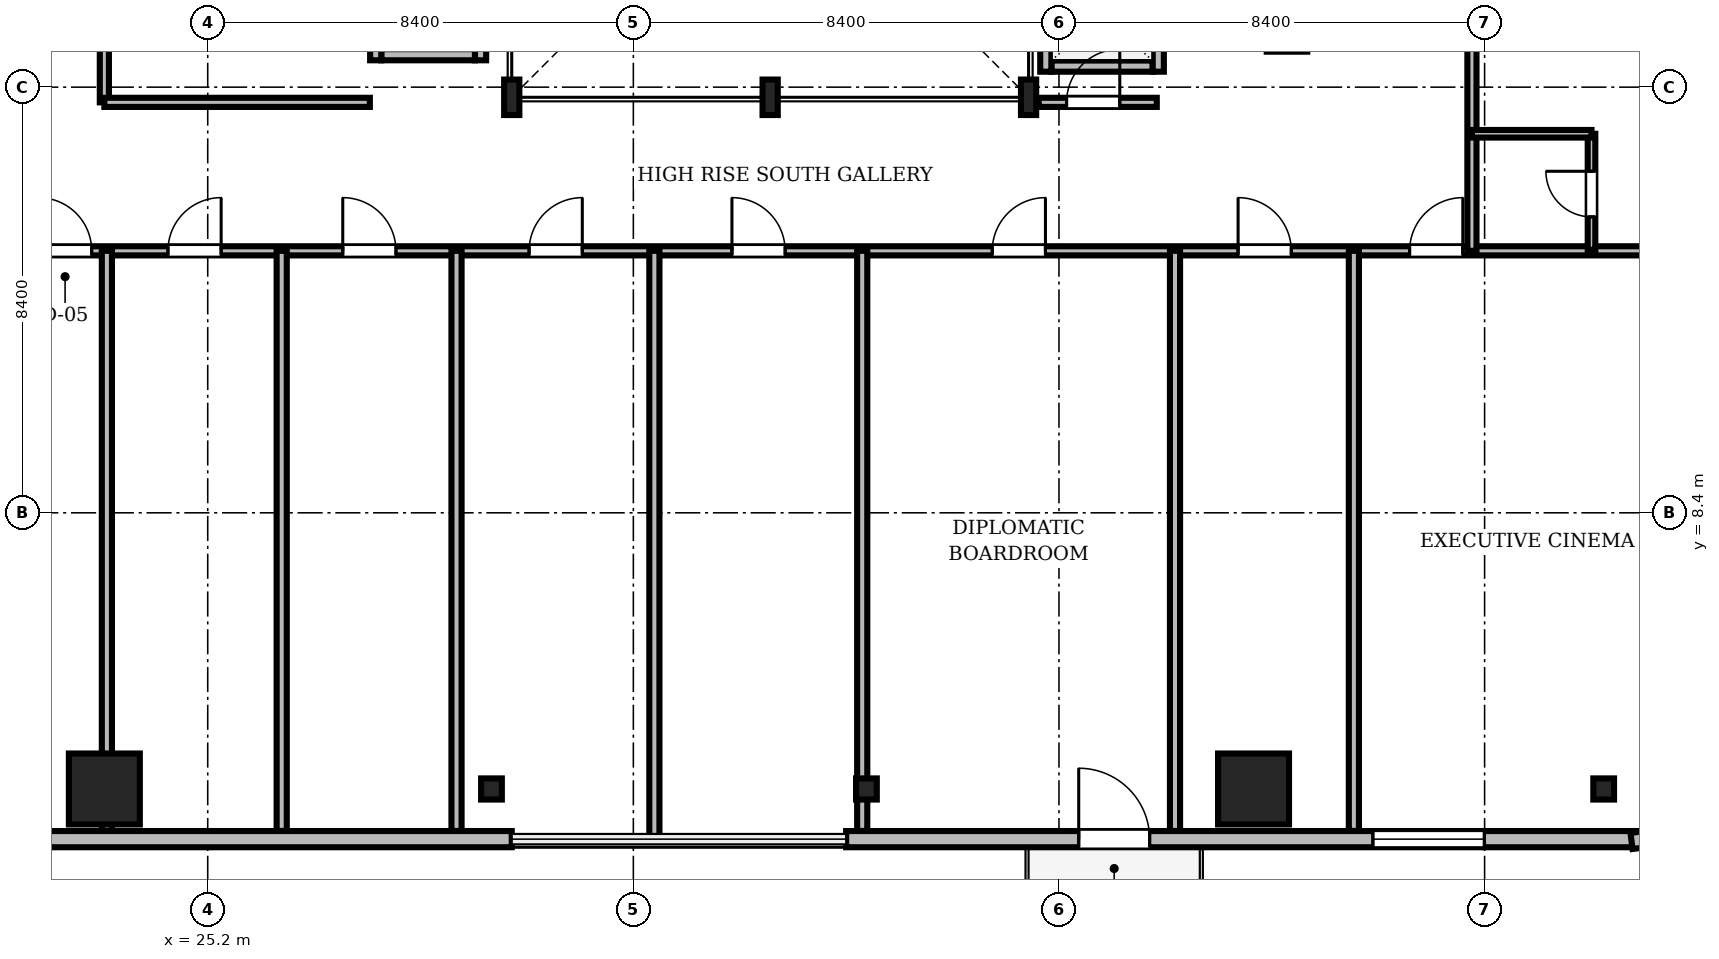
"""IFC4 building model, lengths in metres.
Left out: names, types, materials, properties, quantities, classifications, styles, units other than length and angle.
Written with IfcOpenShell. Run it as: python <this file> out.ifc"""

import sys

from ifc_helpers import new_model, si_unit, direction, frame, frame_2d, origin, origin_2d, place, context, subcontext, project, spatial, rectangle, i_section, extrude, source, transform, mapped, element, fill, save


model = new_model("IFC4")
c1 = context("Model", 3, precision=1e-05, world=origin(), true_north=direction((0.0, 1.0)))
c2 = subcontext(c1, "Body", "Model", "MODEL_VIEW")
j1 = project(units=[si_unit("LENGTHUNIT", "METRE"), si_unit("PLANEANGLEUNIT", "RADIAN")], contexts=[c1])
p1 = place(None, origin())
s1 = spatial("IfcSite", under=j1, at=p1, CompositionType="ELEMENT")
p2 = place(p1, origin())
s2 = spatial("IfcBuilding", under=s1, at=p2, CompositionType="ELEMENT")
p3 = place(p2, frame((0.0, 0.0, 222.3)))
s3 = spatial("IfcBuildingStorey", under=s2, at=p3, CompositionType="ELEMENT", Elevation=222.3)
m1 = source(origin(), c2, "Body", "SweptSolid", [
    extrude(i_section(OverallWidth=0.3, OverallDepth=0.7, WebThickness=0.017, FlangeThickness=0.032, FilletRadius=0.027, at=origin_2d()), origin(), (0.0, 0.0, 1.0), 3.53),
])
for number, where, z_axis, x_axis in (
    (1, (31.2, 16.6, 0.0), (0.0, 0.0, 1.0), (1.0, 0.0, 0.0)),
    (2, (36.3, 16.6, 0.0), (0.0, 0.0, 1.0), (1.0, 0.0, 0.0)),
    (3, (41.4, 16.6, 0.0), (0.0, 0.0, 1.0), (1.0, 0.0, 0.0)),
):
    element("IfcColumn", number, at=place(p3, frame(where, z_axis=z_axis, x_axis=x_axis)), inside=s3, PredefinedType="COLUMN", context=c2, shape_type="MappedRepresentation", body=[
        mapped(m1, transform((0.0, 0.0, 0.0), scale=1.0)),
    ])
m2 = source(origin(), c2, "Body", "SweptSolid", [
    extrude(rectangle(XDim=1.4, YDim=1.4, at=origin_2d()), origin(), (0.0, 0.0, 1.0), 3.53),
])
for number, where, z_axis, x_axis in (
    (4, (23.16, 2.95, 0.0), (0.0, 0.0, 1.0), (1.0, 0.0, 0.0)),
    (5, (45.84, 2.95, 0.0), (0.0, 0.0, 1.0), (1.0, 0.0, 0.0)),
):
    element("IfcColumn", number, at=place(p3, frame(where, z_axis=z_axis, x_axis=x_axis)), inside=s3, PredefinedType="COLUMN", context=c2, shape_type="MappedRepresentation", body=[
        mapped(m2, transform((0.0, 0.0, 0.0), scale=1.0)),
    ])
m3 = source(origin(), c2, "Body", "SweptSolid", [
    extrude(i_section(OverallWidth=0.409, OverallDepth=0.417, WebThickness=0.021, FlangeThickness=0.033, FilletRadius=0.015, at=origin_2d()), origin(), (0.0, 0.0, 1.0), 3.53),
])
for number, where, z_axis, x_axis in (
    (6, (30.8, 2.95, 0.0), (0.0, 0.0, 1.0), (1.0, 0.0, 0.0)),
    (7, (38.2, 2.95, 0.0), (0.0, 0.0, 1.0), (1.0, 0.0, 0.0)),
    (8, (52.75, 2.95, 0.0), (0.0, 0.0, 1.0), (1.0, 0.0, 0.0)),
):
    element("IfcColumn", number, at=place(p3, frame(where, z_axis=z_axis, x_axis=x_axis)), inside=s3, PredefinedType="COLUMN", context=c2, shape_type="MappedRepresentation", body=[
        mapped(m3, transform((0.0, 0.0, 0.0), scale=1.0)),
    ])
m4 = source(origin(), c2, "Body", "SweptSolid", [
    extrude(rectangle(XDim=15.6, YDim=0.32, at=frame_2d((7.8, 0.0))), origin(), (0.0, 0.0, 1.0), 3.53),
])
p4 = place(p3, frame((15.6, 1.96, 0.0), z_axis=(0.0, 0.0, 1.0), x_axis=(1.0, 0.0, 0.0)))
e9 = element("IfcWall", 9, at=p4, inside=s3, PredefinedType="SOLIDWALL", context=c2, shape_type="MappedRepresentation", body=[
    mapped(m4, transform((0.0, 0.0, 0.0), scale=1.0)),
])
m5 = source(origin(), c2, "Body", "SweptSolid", [
    extrude(rectangle(XDim=2.2, YDim=2.4, at=frame_2d((1.1, 1.2))), frame((0.0, 0.17, 0.0), z_axis=(0.0, -1.0, 0.0), x_axis=(1.0, 0.0, 0.0)), (0.0, 0.0, 1.0), 0.34),
])
p5 = place(p4, frame((3.005, 0.0, 0.72)))
e10 = element("IfcOpeningElement", 10, at=p5, cuts=e9, PredefinedType="OPENING", context=c2, shape_type="MappedRepresentation", body=[
    mapped(m5, transform((0.0, 0.0, 0.0), scale=1.0)),
])
p6 = place(p3, frame((37.8, 1.96, 0.0), z_axis=(0.0, 0.0, 1.0), x_axis=(1.0, 0.0, 0.0)))
e11 = element("IfcWall", 11, at=p6, inside=s3, PredefinedType="SOLIDWALL", context=c2, shape_type="MappedRepresentation", body=[
    mapped(m4, transform((0.0, 0.0, 0.0), scale=1.0)),
])
m6 = source(origin(), c2, "Body", "SweptSolid", [
    extrude(rectangle(XDim=1.4, YDim=2.3, at=frame_2d((0.7, 1.15))), frame((0.0, 0.17, 0.0), z_axis=(0.0, -1.0, 0.0), x_axis=(1.0, 0.0, 0.0)), (0.0, 0.0, 1.0), 0.34),
])
p7 = place(p6, frame((4.59, 0.0, 0.0)))
e12 = element("IfcOpeningElement", 12, at=p7, cuts=e11, PredefinedType="OPENING", context=c2, shape_type="MappedRepresentation", body=[
    mapped(m6, transform((0.0, 0.0, 0.0), scale=1.0)),
])
p8 = place(p6, frame((10.395, 0.0, 0.72)))
e13 = element("IfcOpeningElement", 13, at=p8, cuts=e11, PredefinedType="OPENING", context=c2, shape_type="MappedRepresentation", body=[
    mapped(m5, transform((0.0, 0.0, 0.0), scale=1.0)),
])
m7 = source(origin(), c2, "Body", "SweptSolid", [
    extrude(rectangle(XDim=1.17, YDim=0.32, at=frame_2d((0.585, 0.0))), origin(), (0.0, 0.0, 1.0), 3.53),
])
p9 = place(p3, frame((53.3, 1.925, 0.0), z_axis=(0.0, 0.0, 1.0), x_axis=(0.991762485493, 0.128090485085, 0.0)))
e14 = element("IfcWall", 14, at=p9, inside=s3, PredefinedType="SOLIDWALL", context=c2, shape_type="MappedRepresentation", body=[
    mapped(m7, transform((0.0, 0.0, 0.0), scale=1.0)),
])
m8 = source(origin(), c2, "Body", "SweptSolid", [
    extrude(rectangle(XDim=2.0, YDim=0.22, at=frame_2d((1.0, 0.0))), origin(), (0.0, 0.0, 1.0), 3.53),
])
p10 = place(p3, frame((41.85, 17.215, 0.0), z_axis=(0.0, 0.0, 1.0), x_axis=(1.0, 0.0, 0.0)))
e15 = element("IfcWall", 15, at=p10, inside=s3, PredefinedType="SOLIDWALL", context=c2, shape_type="MappedRepresentation", body=[
    mapped(m8, transform((0.0, 0.0, 0.0), scale=1.0)),
])
m9 = source(origin(), c2, "Body", "SweptSolid", [
    extrude(rectangle(XDim=2.19, YDim=0.22, at=frame_2d((1.095, 0.0))), origin(), (0.0, 0.0, 1.0), 3.53),
])
p11 = place(p3, frame((41.74, 17.105, 0.0), z_axis=(0.0, 0.0, 1.0), x_axis=(0.0, 1.0, 0.0)))
e16 = element("IfcWall", 16, at=p11, inside=s3, PredefinedType="SOLIDWALL", context=c2, shape_type="MappedRepresentation", body=[
    mapped(m9, transform((0.0, 0.0, 0.0), scale=1.0)),
])
p12 = place(p3, frame((43.96, 17.105, 0.0), z_axis=(0.0, 0.0, 1.0), x_axis=(0.0, 1.0, 0.0)))
e17 = element("IfcWall", 17, at=p12, inside=s3, PredefinedType="SOLIDWALL", context=c2, shape_type="MappedRepresentation", body=[
    mapped(m9, transform((0.0, 0.0, 0.0), scale=1.0)),
])
m10 = source(origin(), c2, "Body", "SweptSolid", [
    extrude(rectangle(XDim=1.1, YDim=2.2, at=frame_2d((0.55, 1.1))), frame((0.0, 0.12, 0.0), z_axis=(0.0, -1.0, 0.0), x_axis=(1.0, 0.0, 0.0)), (0.0, 0.0, 1.0), 0.24),
])
p13 = place(p12, frame((0.545, 0.0, 0.0)))
e18 = element("IfcOpeningElement", 18, at=p13, cuts=e17, PredefinedType="OPENING", context=c2, shape_type="MappedRepresentation", body=[
    mapped(m10, transform((0.0, 0.0, 0.0), scale=1.0)),
])
m11 = source(origin(), c2, "Body", "SweptSolid", [
    extrude(rectangle(XDim=1.85, YDim=0.22, at=frame_2d((0.925, 0.0))), origin(), (0.0, 0.0, 1.0), 2.972),
])
p14 = place(p3, frame((28.625, 17.44, 0.0), z_axis=(0.0, 0.0, 1.0), x_axis=(1.0, 0.0, 0.0)))
e19 = element("IfcWall", 19, at=p14, inside=s3, PredefinedType="SOLIDWALL", context=c2, shape_type="MappedRepresentation", body=[
    mapped(m11, transform((0.0, 0.0, 0.0), scale=1.0)),
])
m12 = source(origin(), c2, "Body", "SweptSolid", [
    extrude(rectangle(XDim=2.54, YDim=0.22, at=frame_2d((1.27, 0.0))), origin(), (0.0, 0.0, 1.0), 2.972),
])
p15 = place(p3, frame((28.515, 17.33, 0.0), z_axis=(0.0, 0.0, 1.0), x_axis=(0.0, 1.0, 0.0)))
e20 = element("IfcWall", 20, at=p15, inside=s3, PredefinedType="SOLIDWALL", context=c2, shape_type="MappedRepresentation", body=[
    mapped(m12, transform((0.0, 0.0, 0.0), scale=1.0)),
])
m13 = source(origin(), c2, "Body", "SweptSolid", [
    extrude(rectangle(XDim=2.54, YDim=0.22, at=frame_2d((1.27, 0.0))), origin(), (0.0, 0.0, 1.0), 3.53),
])
p16 = place(p3, frame((30.585, 17.33, 0.0), z_axis=(0.0, 0.0, 1.0), x_axis=(0.0, 1.0, 0.0)))
e21 = element("IfcWall", 21, at=p16, inside=s3, PredefinedType="SOLIDWALL", context=c2, shape_type="MappedRepresentation", body=[
    mapped(m13, transform((0.0, 0.0, 0.0), scale=1.0)),
])
m14 = source(origin(), c2, "Body", "SweptSolid", [
    extrude(rectangle(XDim=46.156, YDim=0.18, at=frame_2d((23.078, 0.0))), origin(), (0.0, 0.0, 1.0), 2.772),
])
p17 = place(p3, frame((11.422, 13.57, 0.0), z_axis=(0.0, 0.0, 1.0), x_axis=(1.0, 0.0, 0.0)))
e22 = element("IfcWall", 22, at=p17, inside=s3, PredefinedType="PARTITIONING", context=c2, shape_type="MappedRepresentation", body=[
    mapped(m14, transform((0.0, 0.0, 0.0), scale=1.0)),
])
m15 = source(origin(), c2, "Body", "SweptSolid", [
    extrude(rectangle(XDim=1.05, YDim=2.2, at=frame_2d((0.525, 1.1))), frame((0.0, 0.1, 0.0), z_axis=(0.0, -1.0, 0.0), x_axis=(1.0, 0.0, 0.0)), (0.0, 0.0, 1.0), 0.2),
])
p18 = place(p17, frame((10.438, 0.0, 0.0)))
e23 = element("IfcOpeningElement", 23, at=p18, cuts=e22, PredefinedType="OPENING", context=c2, shape_type="MappedRepresentation", body=[
    mapped(m15, transform((0.0, 0.0, 0.0), scale=1.0)),
])
p19 = place(p17, frame((12.993, 0.0, 0.0)))
e24 = element("IfcOpeningElement", 24, at=p19, cuts=e22, PredefinedType="OPENING", context=c2, shape_type="MappedRepresentation", body=[
    mapped(m15, transform((0.0, 0.0, 0.0), scale=1.0)),
])
p20 = place(p17, frame((16.443, 0.0, 0.0)))
e25 = element("IfcOpeningElement", 25, at=p20, cuts=e22, PredefinedType="OPENING", context=c2, shape_type="MappedRepresentation", body=[
    mapped(m15, transform((0.0, 0.0, 0.0), scale=1.0)),
])
p21 = place(p17, frame((20.121, 0.0, 0.0)))
e26 = element("IfcOpeningElement", 26, at=p21, cuts=e22, PredefinedType="OPENING", context=c2, shape_type="MappedRepresentation", body=[
    mapped(m15, transform((0.0, 0.0, 0.0), scale=1.0)),
])
p22 = place(p17, frame((24.124, 0.0, 0.0)))
e27 = element("IfcOpeningElement", 27, at=p22, cuts=e22, PredefinedType="OPENING", context=c2, shape_type="MappedRepresentation", body=[
    mapped(m15, transform((0.0, 0.0, 0.0), scale=1.0)),
])
p23 = place(p17, frame((29.261, 0.0, 0.0)))
e28 = element("IfcOpeningElement", 28, at=p23, cuts=e22, PredefinedType="OPENING", context=c2, shape_type="MappedRepresentation", body=[
    mapped(m15, transform((0.0, 0.0, 0.0), scale=1.0)),
])
p24 = place(p17, frame((34.113, 0.0, 0.0)))
e29 = element("IfcOpeningElement", 29, at=p24, cuts=e22, PredefinedType="OPENING", context=c2, shape_type="MappedRepresentation", body=[
    mapped(m15, transform((0.0, 0.0, 0.0), scale=1.0)),
])
p25 = place(p17, frame((37.498, 0.0, 0.0)))
e30 = element("IfcOpeningElement", 30, at=p25, cuts=e22, PredefinedType="OPENING", context=c2, shape_type="MappedRepresentation", body=[
    mapped(m15, transform((0.0, 0.0, 0.0), scale=1.0)),
])
m16 = source(origin(), c2, "Body", "SweptSolid", [
    extrude(rectangle(XDim=27.53, YDim=0.18, at=frame_2d((13.765, 0.0))), origin(), (0.0, 0.0, 1.0), 2.972),
])
p26 = place(p3, frame((50.15, 13.57, 0.0), z_axis=(0.0, 0.0, 1.0), x_axis=(0.0, 1.0, 0.0)))
e31 = element("IfcWall", 31, at=p26, inside=s3, PredefinedType="PARTITIONING", context=c2, shape_type="MappedRepresentation", body=[
    mapped(m16, transform((0.0, 0.0, 0.0), scale=1.0)),
])
p27 = place(p26, frame((5.217, 0.0, 0.0)))
e32 = element("IfcOpeningElement", 32, at=p27, cuts=e31, PredefinedType="OPENING", context=c2, shape_type="MappedRepresentation", body=[
    mapped(m15, transform((0.0, 0.0, 0.0), scale=1.0)),
])
p28 = place(p26, frame((14.32, 0.0, 0.0)))
e33 = element("IfcOpeningElement", 33, at=p28, cuts=e31, PredefinedType="OPENING", context=c2, shape_type="MappedRepresentation", body=[
    mapped(m15, transform((0.0, 0.0, 0.0), scale=1.0)),
])
p29 = place(p26, frame((23.423, 0.0, 0.0)))
e34 = element("IfcOpeningElement", 34, at=p29, cuts=e31, PredefinedType="OPENING", context=c2, shape_type="MappedRepresentation", body=[
    mapped(m15, transform((0.0, 0.0, 0.0), scale=1.0)),
])
m17 = source(origin(), c2, "Body", "SweptSolid", [
    extrude(rectangle(XDim=11.94, YDim=0.18, at=frame_2d((5.97, 0.0))), origin(), (0.0, 0.0, 1.0), 2.972),
])
p30 = place(p3, frame((23.16, 16.5, 0.0), z_axis=(0.0, 0.0, 1.0), x_axis=(0.0, 1.0, 0.0)))
e35 = element("IfcWall", 35, at=p30, inside=s3, PredefinedType="PARTITIONING", context=c2, shape_type="MappedRepresentation", body=[
    mapped(m17, transform((0.0, 0.0, 0.0), scale=1.0)),
])
p31 = place(p30, frame((4.5, 0.0, 0.0)))
e36 = element("IfcOpeningElement", 36, at=p31, cuts=e35, PredefinedType="OPENING", context=c2, shape_type="MappedRepresentation", body=[
    mapped(m15, transform((0.0, 0.0, 0.0), scale=1.0)),
])
m18 = source(origin(), c2, "Body", "SweptSolid", [
    extrude(rectangle(XDim=2.33, YDim=0.18, at=frame_2d((1.165, 0.0))), origin(), (0.0, 0.0, 1.0), 2.972),
])
p32 = place(p3, frame((41.6, 16.5, 0.0), z_axis=(0.0, 0.0, 1.0), x_axis=(1.0, 0.0, 0.0)))
e37 = element("IfcWall", 37, at=p32, inside=s3, PredefinedType="PARTITIONING", context=c2, shape_type="MappedRepresentation", body=[
    mapped(m18, transform((0.0, 0.0, 0.0), scale=1.0)),
])
p33 = place(p32, frame((0.55, 0.0, 0.0)))
e38 = element("IfcOpeningElement", 38, at=p33, cuts=e37, PredefinedType="OPENING", context=c2, shape_type="MappedRepresentation", body=[
    mapped(m15, transform((0.0, 0.0, 0.0), scale=1.0)),
])
m19 = source(origin(), c2, "Body", "SweptSolid", [
    extrude(rectangle(XDim=2.29, YDim=0.15, at=frame_2d((1.145, 0.0))), origin(), (0.0, 0.0, 1.0), 2.972),
])
p34 = place(p3, frame((52.51, 13.59, 0.0), z_axis=(0.0, 0.0, 1.0), x_axis=(0.0, 1.0, 0.0)))
e39 = element("IfcWall", 39, at=p34, inside=s3, PredefinedType="PARTITIONING", context=c2, shape_type="MappedRepresentation", body=[
    mapped(m19, transform((0.0, 0.0, 0.0), scale=1.0)),
])
m20 = source(origin(), c2, "Body", "SweptSolid", [
    extrude(rectangle(XDim=0.9, YDim=2.1, at=frame_2d((0.45, 1.05))), frame((0.0, 0.085, 0.0), z_axis=(0.0, -1.0, 0.0), x_axis=(1.0, 0.0, 0.0)), (0.0, 0.0, 1.0), 0.17),
])
p35 = place(p34, frame((0.65, 0.0, 0.0)))
e40 = element("IfcOpeningElement", 40, at=p35, cuts=e39, PredefinedType="OPENING", context=c2, shape_type="MappedRepresentation", body=[
    mapped(m20, transform((0.0, 0.0, 0.0), scale=1.0)),
])
m21 = source(origin(), c2, "Body", "SweptSolid", [
    extrude(rectangle(XDim=11.448, YDim=0.2, at=frame_2d((5.724, 0.0))), origin(), (0.0, 0.0, 1.0), 2.772),
])
for number, where, z_axis, x_axis in (
    (41, (23.21, 2.122, 0.0), (0.0, 0.0, 1.0), (0.0, 1.0, 0.0)),
    (42, (26.66, 2.122, 0.0), (0.0, 0.0, 1.0), (0.0, 1.0, 0.0)),
    (43, (30.11, 2.122, 0.0), (0.0, 0.0, 1.0), (0.0, 1.0, 0.0)),
):
    element("IfcWall", number, at=place(p3, frame(where, z_axis=z_axis, x_axis=x_axis)), inside=s3, PredefinedType="PARTITIONING", context=c2, shape_type="MappedRepresentation", body=[
        mapped(m21, transform((0.0, 0.0, 0.0), scale=1.0)),
    ])
m22 = source(origin(), c2, "Body", "SweptSolid", [
    extrude(rectangle(XDim=11.64, YDim=0.2, at=frame_2d((5.82, 0.0))), origin(), (0.0, 0.0, 1.0), 2.772),
])
p36 = place(p3, frame((34.015, 1.93, 0.0), z_axis=(0.0, 0.0, 1.0), x_axis=(0.0, 1.0, 0.0)))
e44 = element("IfcWall", 44, at=p36, inside=s3, PredefinedType="PARTITIONING", context=c2, shape_type="MappedRepresentation", body=[
    mapped(m22, transform((0.0, 0.0, 0.0), scale=1.0)),
])
for number, where, z_axis, x_axis in (
    (45, (38.117, 2.122, 0.0), (0.0, 0.0, 1.0), (0.0, 1.0, 0.0)),
    (46, (44.29, 2.122, 0.0), (0.0, 0.0, 1.0), (0.0, 1.0, 0.0)),
    (47, (47.82, 2.122, 0.0), (0.0, 0.0, 1.0), (0.0, 1.0, 0.0)),
):
    element("IfcWall", number, at=place(p3, frame(where, z_axis=z_axis, x_axis=x_axis)), inside=s3, PredefinedType="PARTITIONING", context=c2, shape_type="MappedRepresentation", body=[
        mapped(m21, transform((0.0, 0.0, 0.0), scale=1.0)),
    ])
m23 = source(origin(), c2, "Body", "SweptSolid", [
    extrude(rectangle(XDim=5.24, YDim=0.18, at=frame_2d((2.62, 0.0))), origin(), (0.0, 0.0, 1.0), 3.53),
])
p37 = place(p3, frame((23.16, 16.5, 0.0), z_axis=(0.0, 0.0, 1.0), x_axis=(1.0, 0.0, 0.0)))
e48 = element("IfcWall", 48, at=p37, inside=s3, PredefinedType="PARTITIONING", context=c2, shape_type="MappedRepresentation", body=[
    mapped(m23, transform((0.0, 0.0, 0.0), scale=1.0)),
])
m24 = source(origin(), c2, "Body", "SweptSolid", [
    extrude(rectangle(XDim=2.36, YDim=0.15, at=frame_2d((1.18, 0.0))), origin(), (0.0, 0.0, 1.0), 3.53),
])
p38 = place(p3, frame((50.15, 15.88, 0.0), z_axis=(0.0, 0.0, 1.0), x_axis=(1.0, 0.0, 0.0)))
e49 = element("IfcWall", 49, at=p38, inside=s3, PredefinedType="PARTITIONING", context=c2, shape_type="MappedRepresentation", body=[
    mapped(m24, transform((0.0, 0.0, 0.0), scale=1.0)),
])
m25 = source(origin(), c2, "Body", "SweptSolid", [
    extrude(rectangle(XDim=1.4, YDim=2.3, at=frame_2d((0.7, 1.15))), frame((0.0, 0.025, 0.0), z_axis=(0.0, -1.0, 0.0), x_axis=(1.0, 0.0, 0.0)), (0.0, 0.0, 1.0), 0.05),
])
p39 = place(p7, frame((1.4, 0.0, 0.0), z_axis=(0.0, 0.0, 1.0), x_axis=(-1.0, 0.0, 0.0)))
e50 = element("IfcDoor", 50, at=p39, inside=s3, OperationType="DOUBLE_DOOR_SLIDING", PredefinedType="DOOR", context=c2, shape_type="MappedRepresentation", body=[
    mapped(m25, transform((0.0, 0.0, 0.0), scale=1.0)),
])
fill(e12, e50)
m26 = source(origin(), c2, "Body", "SweptSolid", [
    extrude(rectangle(XDim=2.2, YDim=2.4, at=frame_2d((1.1, 1.2))), frame((0.0, 0.03, 0.0), z_axis=(0.0, -1.0, 0.0), x_axis=(1.0, 0.0, 0.0)), (0.0, 0.0, 1.0), 0.06),
])
p40 = place(p8, origin())
e51 = element("IfcWindow", 51, at=p40, inside=s3, PartitioningType="SINGLE_PANEL", PredefinedType="WINDOW", context=c2, shape_type="MappedRepresentation", body=[
    mapped(m26, transform((0.0, 0.0, 0.0), scale=1.0)),
])
fill(e13, e51)
m27 = source(origin(), c2, "Body", "SweptSolid", [
    extrude(rectangle(XDim=1.05, YDim=2.2, at=frame_2d((0.525, 1.1))), frame((0.0, 0.025, 0.0), z_axis=(0.0, -1.0, 0.0), x_axis=(1.0, 0.0, 0.0)), (0.0, 0.0, 1.0), 0.05),
])
p41 = place(p18, origin())
e52 = element("IfcDoor", 52, at=p41, inside=s3, OperationType="SINGLE_SWING_LEFT", PredefinedType="DOOR", context=c2, shape_type="MappedRepresentation", body=[
    mapped(m27, transform((0.0, 0.0, 0.0), scale=1.0)),
])
fill(e23, e52)
p42 = place(p19, origin())
e53 = element("IfcDoor", 53, at=p42, inside=s3, OperationType="SINGLE_SWING_RIGHT", PredefinedType="DOOR", context=c2, shape_type="MappedRepresentation", body=[
    mapped(m27, transform((0.0, 0.0, 0.0), scale=1.0)),
])
fill(e24, e53)
p43 = place(p20, origin())
e54 = element("IfcDoor", 54, at=p43, inside=s3, OperationType="SINGLE_SWING_LEFT", PredefinedType="DOOR", context=c2, shape_type="MappedRepresentation", body=[
    mapped(m27, transform((0.0, 0.0, 0.0), scale=1.0)),
])
fill(e25, e54)
p44 = place(p21, origin())
e55 = element("IfcDoor", 55, at=p44, inside=s3, OperationType="SINGLE_SWING_RIGHT", PredefinedType="DOOR", context=c2, shape_type="MappedRepresentation", body=[
    mapped(m27, transform((0.0, 0.0, 0.0), scale=1.0)),
])
fill(e26, e55)
p45 = place(p22, origin())
e56 = element("IfcDoor", 56, at=p45, inside=s3, OperationType="SINGLE_SWING_LEFT", PredefinedType="DOOR", context=c2, shape_type="MappedRepresentation", body=[
    mapped(m27, transform((0.0, 0.0, 0.0), scale=1.0)),
])
fill(e27, e56)
p46 = place(p23, origin())
e57 = element("IfcDoor", 57, at=p46, inside=s3, OperationType="SINGLE_SWING_RIGHT", PredefinedType="DOOR", context=c2, shape_type="MappedRepresentation", body=[
    mapped(m27, transform((0.0, 0.0, 0.0), scale=1.0)),
])
fill(e28, e57)
p47 = place(p24, origin())
e58 = element("IfcDoor", 58, at=p47, inside=s3, OperationType="SINGLE_SWING_LEFT", PredefinedType="DOOR", context=c2, shape_type="MappedRepresentation", body=[
    mapped(m27, transform((0.0, 0.0, 0.0), scale=1.0)),
])
fill(e29, e58)
p48 = place(p25, origin())
e59 = element("IfcDoor", 59, at=p48, inside=s3, OperationType="SINGLE_SWING_RIGHT", PredefinedType="DOOR", context=c2, shape_type="MappedRepresentation", body=[
    mapped(m27, transform((0.0, 0.0, 0.0), scale=1.0)),
])
fill(e30, e59)
p49 = place(p33, origin())
e60 = element("IfcDoor", 60, at=p49, inside=s3, OperationType="SINGLE_SWING_RIGHT", PredefinedType="DOOR", context=c2, shape_type="MappedRepresentation", body=[
    mapped(m27, transform((0.0, 0.0, 0.0), scale=1.0)),
])
fill(e38, e60)
m28 = source(origin(), c2, "Body", "SweptSolid", [
    extrude(rectangle(XDim=0.9, YDim=2.1, at=frame_2d((0.45, 1.05))), frame((0.0, 0.025, 0.0), z_axis=(0.0, -1.0, 0.0), x_axis=(1.0, 0.0, 0.0)), (0.0, 0.0, 1.0), 0.05),
])
p50 = place(p35, origin())
e61 = element("IfcDoor", 61, at=p50, inside=s3, OperationType="SINGLE_SWING_RIGHT", PredefinedType="DOOR", context=c2, shape_type="MappedRepresentation", body=[
    mapped(m28, transform((0.0, 0.0, 0.0), scale=1.0)),
])
fill(e40, e61)
save(model, sys.argv[1])
